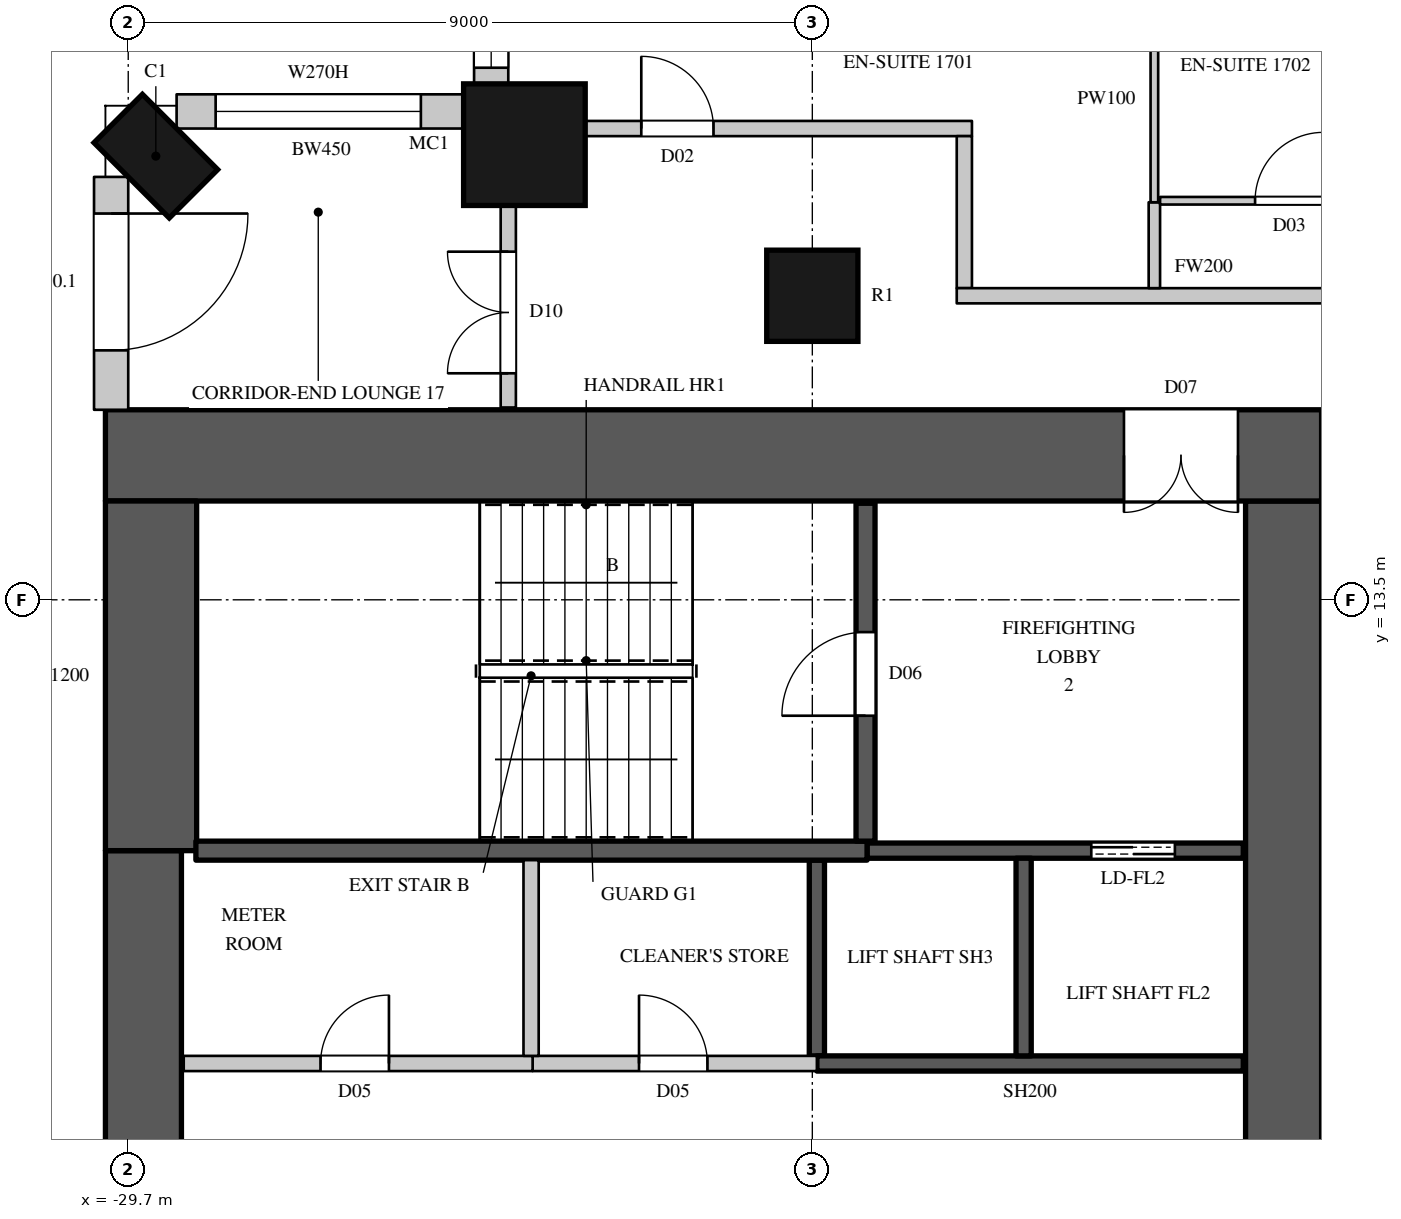
"""IFC4 building model, lengths in metres.
Left out: names, types, materials, properties, quantities, classifications, styles, units other than length and angle.
Written with IfcOpenShell. Run it as: python <this file> out.ifc"""

import sys

from ifc_helpers import new_model, si_unit, direction, frame, frame_2d, origin, origin_2d, place, context, subcontext, project, spatial, rectangle, circle, extrude, element, fill, save


model = new_model("IFC4")
c1 = context("Model", 3, precision=1e-05, world=origin(), true_north=direction((0.0, 1.0)))
c2 = subcontext(c1, "Body", "Model", "MODEL_VIEW")
j1 = project(units=[si_unit("LENGTHUNIT", "METRE"), si_unit("PLANEANGLEUNIT", "RADIAN")], contexts=[c1])
p1 = place(None, origin())
s1 = spatial("IfcSite", under=j1, at=p1, CompositionType="ELEMENT")
p2 = place(p1, origin())
s2 = spatial("IfcBuilding", under=s1, at=p2, CompositionType="ELEMENT")
p3 = place(p2, frame((0.0, 0.0, 91.5)))
s3 = spatial("IfcBuildingStorey", under=s2, at=p3, CompositionType="ELEMENT", Elevation=91.5)
p4 = place(p3, frame((-29.337, 19.337, 0.0), z_axis=(0.0, 0.0, 1.0), x_axis=(-0.707106781187, -0.707106781187, 0.0)))
e1 = element("IfcColumn", 1, at=p4, inside=s3, PredefinedType="COLUMN", context=c2, shape_type="SweptSolid", body=[
    extrude(rectangle(XDim=0.9, YDim=1.4, at=origin_2d()), origin(), (0.0, 0.0, 1.0), 3.6),
])
p5 = place(p3, frame((-24.488, 19.488, 0.0), z_axis=(0.0, 0.0, 1.0), x_axis=(1.0, 0.0, 0.0)))
e2 = element("IfcColumn", 2, at=p5, inside=s3, PredefinedType="COLUMN", context=c2, shape_type="SweptSolid", body=[
    extrude(circle(Radius=0.8, at=origin_2d()), origin(), (0.0, 0.0, 1.0), 3.6),
])
p6 = place(p3, frame((-20.7, 17.5, 0.0), z_axis=(0.0, 0.0, 1.0), x_axis=(1.0, 0.0, 0.0)))
e3 = element("IfcColumn", 3, at=p6, inside=s3, PredefinedType="COLUMN", context=c2, shape_type="SweptSolid", body=[
    extrude(circle(Radius=0.6, at=origin_2d()), origin(), (0.0, 0.0, 1.0), 3.6),
])
p7 = place(p3, frame((-29.925, 19.064, 0.0), z_axis=(0.0, 0.0, 1.0), x_axis=(0.0, -1.0, 0.0)))
e4 = element("IfcWall", 4, at=p7, inside=s3, PredefinedType="SOLIDWALL", context=c2, shape_type="SweptSolid", body=[
    extrude(rectangle(XDim=3.064, YDim=0.45, at=frame_2d((1.532, 0.0))), origin(), (0.0, 0.0, 1.0), 3.3),
])
p8 = place(p7, frame((0.482, 0.0, 0.0)))
e5 = element("IfcOpeningElement", 5, at=p8, cuts=e4, PredefinedType="OPENING", context=c2, shape_type="SweptSolid", body=[
    extrude(rectangle(XDim=1.8, YDim=2.4, at=frame_2d((0.9, 1.2))), frame((0.0, 0.235, 0.0), z_axis=(0.0, -1.0, 0.0), x_axis=(1.0, 0.0, 0.0)), (0.0, 0.0, 1.0), 0.47),
])
p9 = place(p3, frame((-24.925, 22.05, 0.0), z_axis=(0.0, 0.0, 1.0), x_axis=(0.0, -1.0, 0.0)))
e6 = element("IfcWall", 6, at=p9, inside=s3, PredefinedType="SOLIDWALL", context=c2, shape_type="SweptSolid", body=[
    extrude(rectangle(XDim=1.792, YDim=0.45, at=frame_2d((0.896, 0.0))), origin(), (0.0, 0.0, 1.0), 3.3),
])
p10 = place(p9, frame((0.35, 0.0, 1.05)))
e7 = element("IfcOpeningElement", 7, at=p10, cuts=e6, PredefinedType="OPENING", context=c2, shape_type="SweptSolid", body=[
    extrude(rectangle(XDim=1.2, YDim=2.0, at=frame_2d((0.6, 1.0))), frame((0.0, 0.235, 0.0), z_axis=(0.0, -1.0, 0.0), x_axis=(1.0, 0.0, 0.0)), (0.0, 0.0, 1.0), 0.47),
])
p11 = place(p3, frame((-25.259, 19.925, 0.0), z_axis=(0.0, 0.0, 1.0), x_axis=(-1.0, 0.0, 0.0)))
e8 = element("IfcWall", 8, at=p11, inside=s3, PredefinedType="SOLIDWALL", context=c2, shape_type="SweptSolid", body=[
    extrude(rectangle(XDim=3.805, YDim=0.45, at=frame_2d((1.903, 0.0))), origin(), (0.0, 0.0, 1.0), 3.3),
])
p12 = place(p11, frame((0.592, 0.0, 1.05)))
e9 = element("IfcOpeningElement", 9, at=p12, cuts=e8, PredefinedType="OPENING", context=c2, shape_type="SweptSolid", body=[
    extrude(rectangle(XDim=2.7, YDim=2.0, at=frame_2d((1.35, 1.0))), frame((0.0, 0.235, 0.0), z_axis=(0.0, -1.0, 0.0), x_axis=(1.0, 0.0, 0.0)), (0.0, 0.0, 1.0), 0.47),
])
p13 = place(p3, frame((-30.0, 15.4, 0.0), z_axis=(0.0, 0.0, 1.0), x_axis=(1.0, 0.0, 0.0)))
e10 = element("IfcWall", 10, at=p13, inside=s3, PredefinedType="SHEAR", context=c2, shape_type="SweptSolid", body=[
    extrude(rectangle(XDim=16.0, YDim=1.2, at=frame_2d((8.0, 0.0))), origin(), (0.0, 0.0, 1.0), 3.6),
])
p14 = place(p13, frame((13.4, 0.0, 0.0)))
e11 = element("IfcOpeningElement", 11, at=p14, cuts=e10, PredefinedType="OPENING", context=c2, shape_type="SweptSolid", body=[
    extrude(rectangle(XDim=1.5, YDim=2.4, at=frame_2d((0.75, 1.2))), frame((0.0, 0.61, 0.0), z_axis=(0.0, -1.0, 0.0), x_axis=(1.0, 0.0, 0.0)), (0.0, 0.0, 1.0), 1.22),
])
p15 = place(p3, frame((-14.5, -14.8, 0.0), z_axis=(0.0, 0.0, 1.0), x_axis=(0.0, 1.0, 0.0)))
e12 = element("IfcWall", 12, at=p15, inside=s3, PredefinedType="SHEAR", context=c2, shape_type="SweptSolid", body=[
    extrude(rectangle(XDim=29.6, YDim=1.0, at=frame_2d((14.8, 0.0))), origin(), (0.0, 0.0, 1.0), 3.6),
])
p16 = place(p15, frame((8.45, 0.0, 0.0)))
e13 = element("IfcOpeningElement", 13, at=p16, cuts=e12, PredefinedType="OPENING", context=c2, shape_type="SweptSolid", body=[
    extrude(rectangle(XDim=1.5, YDim=2.4, at=frame_2d((0.75, 1.2))), frame((0.0, 0.51, 0.0), z_axis=(0.0, -1.0, 0.0), x_axis=(1.0, 0.0, 0.0)), (0.0, 0.0, 1.0), 1.02),
])
p17 = place(p15, frame((19.65, 0.0, 0.0)))
e14 = element("IfcOpeningElement", 14, at=p17, cuts=e12, PredefinedType="OPENING", context=c2, shape_type="SweptSolid", body=[
    extrude(rectangle(XDim=1.5, YDim=2.4, at=frame_2d((0.75, 1.2))), frame((0.0, 0.51, 0.0), z_axis=(0.0, -1.0, 0.0), x_axis=(1.0, 0.0, 0.0)), (0.0, 0.0, 1.0), 1.02),
])
p18 = place(p15, frame((14.5, 0.0, 0.0)))
e15 = element("IfcOpeningElement", 15, at=p18, cuts=e12, PredefinedType="OPENING", context=c2, shape_type="SweptSolid", body=[
    extrude(rectangle(XDim=0.6, YDim=2.0, at=frame_2d((0.3, 1.0))), frame((0.0, 0.51, 0.0), z_axis=(0.0, -1.0, 0.0), x_axis=(1.0, 0.0, 0.0)), (0.0, 0.0, 1.0), 1.02),
])
p19 = place(p3, frame((-29.5, -10.2, 0.0), z_axis=(0.0, 0.0, 1.0), x_axis=(0.0, 1.0, 0.0)))
e16 = element("IfcWall", 16, at=p19, inside=s3, PredefinedType="SHEAR", context=c2, shape_type="SweptSolid", body=[
    extrude(rectangle(XDim=20.4, YDim=1.0, at=frame_2d((10.2, 0.0))), origin(), (0.0, 0.0, 1.0), 3.6),
])
p20 = place(p3, frame((-29.4, 10.2, 0.0), z_axis=(0.0, 0.0, 1.0), x_axis=(0.0, 1.0, 0.0)))
e17 = element("IfcWall", 17, at=p20, inside=s3, PredefinedType="SHEAR", context=c2, shape_type="SweptSolid", body=[
    extrude(rectangle(XDim=4.6, YDim=1.2, at=frame_2d((2.3, 0.0))), origin(), (0.0, 0.0, 1.0), 3.6),
])
p21 = place(p3, frame((-24.7, 16.03, 0.0), z_axis=(0.0, 0.0, 1.0), x_axis=(0.0, 1.0, 0.0)))
e18 = element("IfcWall", 18, at=p21, inside=s3, PredefinedType="PARTITIONING", context=c2, shape_type="SweptSolid", body=[
    extrude(rectangle(XDim=2.67, YDim=0.2, at=frame_2d((1.335, 0.0))), origin(), (0.0, 0.0, 1.0), 3.3),
])
p22 = place(p21, frame((0.45, 0.0, 0.0)))
e19 = element("IfcOpeningElement", 19, at=p22, cuts=e18, PredefinedType="OPENING", context=c2, shape_type="SweptSolid", body=[
    extrude(rectangle(XDim=1.6, YDim=2.4, at=frame_2d((0.8, 1.2))), frame((0.0, 0.11, 0.0), z_axis=(0.0, -1.0, 0.0), x_axis=(1.0, 0.0, 0.0)), (0.0, 0.0, 1.0), 0.22),
])
p23 = place(p3, frame((-23.7, 19.7, 0.0), z_axis=(0.0, 0.0, 1.0), x_axis=(1.0, 0.0, 0.0)))
e20 = element("IfcWall", 20, at=p23, inside=s3, PredefinedType="PARTITIONING", context=c2, shape_type="SweptSolid", body=[
    extrude(rectangle(XDim=5.1, YDim=0.2, at=frame_2d((2.55, 0.0))), origin(), (0.0, 0.0, 1.0), 3.3),
])
p24 = place(p23, frame((0.75, 0.0, 0.0)))
e21 = element("IfcOpeningElement", 21, at=p24, cuts=e20, PredefinedType="OPENING", context=c2, shape_type="SweptSolid", body=[
    extrude(rectangle(XDim=0.95, YDim=2.2, at=frame_2d((0.475, 1.1))), frame((0.0, 0.11, 0.0), z_axis=(0.0, -1.0, 0.0), x_axis=(1.0, 0.0, 0.0)), (0.0, 0.0, 1.0), 0.22),
])
p25 = place(p3, frame((-24.38, 7.4, 0.0), z_axis=(0.0, 0.0, 1.0), x_axis=(1.0, 0.0, 0.0)))
e22 = element("IfcWall", 22, at=p25, inside=s3, PredefinedType="PARTITIONING", context=c2, shape_type="SweptSolid", body=[
    extrude(rectangle(XDim=3.74, YDim=0.2, at=frame_2d((1.87, 0.0))), origin(), (0.0, 0.0, 1.0), 3.3),
])
p26 = place(p25, frame((1.4, 0.0, 0.0)))
e23 = element("IfcOpeningElement", 23, at=p26, cuts=e22, PredefinedType="OPENING", context=c2, shape_type="SweptSolid", body=[
    extrude(rectangle(XDim=0.9, YDim=2.2, at=frame_2d((0.45, 1.1))), frame((0.0, 0.11, 0.0), z_axis=(0.0, -1.0, 0.0), x_axis=(1.0, 0.0, 0.0)), (0.0, 0.0, 1.0), 0.22),
])
p27 = place(p3, frame((-18.7, 17.6, 0.0), z_axis=(0.0, 0.0, 1.0), x_axis=(0.0, 1.0, 0.0)))
e24 = element("IfcWall", 24, at=p27, inside=s3, PredefinedType="PARTITIONING", context=c2, shape_type="SweptSolid", body=[
    extrude(rectangle(XDim=2.0, YDim=0.2, at=frame_2d((1.0, 0.0))), origin(), (0.0, 0.0, 1.0), 3.3),
])
p28 = place(p3, frame((-18.8, 17.5, 0.0), z_axis=(0.0, 0.0, 1.0), x_axis=(1.0, 0.0, 0.0)))
e25 = element("IfcWall", 25, at=p28, inside=s3, PredefinedType="PARTITIONING", context=c2, shape_type="SweptSolid", body=[
    extrude(rectangle(XDim=6.5, YDim=0.2, at=frame_2d((3.25, 0.0))), origin(), (0.0, 0.0, 1.0), 2.75),
])
p29 = place(p28, frame((5.25, 0.0, 0.0)))
e26 = element("IfcOpeningElement", 26, at=p29, cuts=e25, PredefinedType="OPENING", context=c2, shape_type="SweptSolid", body=[
    extrude(rectangle(XDim=0.95, YDim=2.2, at=frame_2d((0.475, 1.1))), frame((0.0, 0.11, 0.0), z_axis=(0.0, -1.0, 0.0), x_axis=(1.0, 0.0, 0.0)), (0.0, 0.0, 1.0), 0.22),
])
p30 = place(p3, frame((-16.2, 17.6, 0.0), z_axis=(0.0, 0.0, 1.0), x_axis=(0.0, 1.0, 0.0)))
e27 = element("IfcWall", 27, at=p30, inside=s3, PredefinedType="PARTITIONING", context=c2, shape_type="SweptSolid", body=[
    extrude(rectangle(XDim=1.13, YDim=0.15, at=frame_2d((0.565, 0.0))), origin(), (0.0, 0.0, 1.0), 2.65),
])
p31 = place(p3, frame((-28.97, 7.4, 0.0), z_axis=(0.0, 0.0, 1.0), x_axis=(1.0, 0.0, 0.0)))
e28 = element("IfcWall", 28, at=p31, inside=s3, PredefinedType="PARTITIONING", context=c2, shape_type="SweptSolid", body=[
    extrude(rectangle(XDim=4.59, YDim=0.2, at=frame_2d((2.295, 0.0))), origin(), (0.0, 0.0, 1.0), 3.3),
])
p32 = place(p31, frame((1.8, 0.0, 0.0)))
e29 = element("IfcOpeningElement", 29, at=p32, cuts=e28, PredefinedType="OPENING", context=c2, shape_type="SweptSolid", body=[
    extrude(rectangle(XDim=0.9, YDim=2.2, at=frame_2d((0.45, 1.1))), frame((0.0, 0.11, 0.0), z_axis=(0.0, -1.0, 0.0), x_axis=(1.0, 0.0, 0.0)), (0.0, 0.0, 1.0), 0.22),
])
p33 = place(p3, frame((-24.4, 7.5, 0.0), z_axis=(0.0, 0.0, 1.0), x_axis=(0.0, 1.0, 0.0)))
e30 = element("IfcWall", 30, at=p33, inside=s3, PredefinedType="PARTITIONING", context=c2, shape_type="SweptSolid", body=[
    extrude(rectangle(XDim=2.575, YDim=0.2, at=frame_2d((1.288, 0.0))), origin(), (0.0, 0.0, 1.0), 3.3),
])
p34 = place(p3, frame((-20.64, 7.5, 0.0), z_axis=(0.0, 0.0, 1.0), x_axis=(0.0, 1.0, 0.0)))
e31 = element("IfcWall", 31, at=p34, inside=s3, PredefinedType="SHEAR", context=c2, shape_type="SweptSolid", body=[
    extrude(rectangle(XDim=2.575, YDim=0.2, at=frame_2d((1.288, 0.0))), origin(), (0.0, 0.0, 1.0), 3.3),
])
p35 = place(p3, frame((-20.64, 7.4, 0.0), z_axis=(0.0, 0.0, 1.0), x_axis=(1.0, 0.0, 0.0)))
e32 = element("IfcWall", 32, at=p35, inside=s3, PredefinedType="SHEAR", context=c2, shape_type="SweptSolid", body=[
    extrude(rectangle(XDim=5.61, YDim=0.2, at=frame_2d((2.805, 0.0))), origin(), (0.0, 0.0, 1.0), 3.3),
])
p36 = place(p3, frame((-19.98, 10.2, 0.0), z_axis=(0.0, 0.0, 1.0), x_axis=(1.0, 0.0, 0.0)))
e33 = element("IfcWall", 33, at=p36, inside=s3, PredefinedType="SHEAR", context=c2, shape_type="SweptSolid", body=[
    extrude(rectangle(XDim=4.95, YDim=0.2, at=frame_2d((2.475, 0.0))), origin(), (0.0, 0.0, 1.0), 3.3),
])
p37 = place(p36, frame((2.95, 0.0, 0.0)))
e34 = element("IfcOpeningElement", 34, at=p37, cuts=e33, PredefinedType="OPENING", context=c2, shape_type="SweptSolid", body=[
    extrude(rectangle(XDim=1.1, YDim=2.2, at=frame_2d((0.55, 1.1))), frame((0.0, 0.11, 0.0), z_axis=(0.0, -1.0, 0.0), x_axis=(1.0, 0.0, 0.0)), (0.0, 0.0, 1.0), 0.22),
])
p38 = place(p3, frame((-17.92, 7.5, 0.0), z_axis=(0.0, 0.0, 1.0), x_axis=(0.0, 1.0, 0.0)))
e35 = element("IfcWall", 35, at=p38, inside=s3, PredefinedType="SHEAR", context=c2, shape_type="SweptSolid", body=[
    extrude(rectangle(XDim=2.6, YDim=0.2, at=frame_2d((1.3, 0.0))), origin(), (0.0, 0.0, 1.0), 3.6),
])
p39 = place(p3, frame((-28.81, 10.2, 0.0), z_axis=(0.0, 0.0, 1.0), x_axis=(1.0, 0.0, 0.0)))
e36 = element("IfcWall", 36, at=p39, inside=s3, PredefinedType="SHEAR", context=c2, shape_type="SweptSolid", body=[
    extrude(rectangle(XDim=8.83, YDim=0.25, at=frame_2d((4.415, 0.0))), origin(), (0.0, 0.0, 1.0), 3.3),
])
p40 = place(p3, frame((-20.0, 10.325, 0.0), z_axis=(0.0, 0.0, 1.0), x_axis=(0.0, 1.0, 0.0)))
e37 = element("IfcWall", 37, at=p40, inside=s3, PredefinedType="SHEAR", context=c2, shape_type="SweptSolid", body=[
    extrude(rectangle(XDim=4.445, YDim=0.25, at=frame_2d((2.223, 0.0))), origin(), (0.0, 0.0, 1.0), 3.3),
])
p41 = place(p40, frame((1.65, 0.0, 0.0)))
e38 = element("IfcOpeningElement", 38, at=p41, cuts=e37, PredefinedType="OPENING", context=c2, shape_type="SweptSolid", body=[
    extrude(rectangle(XDim=1.1, YDim=2.2, at=frame_2d((0.55, 1.1))), frame((0.0, 0.135, 0.0), z_axis=(0.0, -1.0, 0.0), x_axis=(1.0, 0.0, 0.0)), (0.0, 0.0, 1.0), 0.27),
])
p42 = place(p3, frame((-16.2, 18.73, 0.0), z_axis=(0.0, 0.0, 1.0), x_axis=(0.0, 1.0, 0.0)))
e39 = element("IfcWall", 39, at=p42, inside=s3, PredefinedType="PARTITIONING", context=c2, shape_type="SweptSolid", body=[
    extrude(rectangle(XDim=2.7, YDim=0.1, at=frame_2d((1.35, 0.0))), origin(), (0.0, 0.0, 1.0), 2.65),
])
p43 = place(p3, frame((-16.125, 18.75, 0.0), z_axis=(0.0, 0.0, 1.0), x_axis=(1.0, 0.0, 0.0)))
e40 = element("IfcWall", 40, at=p43, inside=s3, PredefinedType="PARTITIONING", context=c2, shape_type="SweptSolid", body=[
    extrude(rectangle(XDim=2.371, YDim=0.1, at=frame_2d((1.186, 0.0))), origin(), (0.0, 0.0, 1.0), 3.3),
])
p44 = place(p43, frame((1.25, 0.0, 0.0)))
e41 = element("IfcOpeningElement", 41, at=p44, cuts=e40, PredefinedType="OPENING", context=c2, shape_type="SweptSolid", body=[
    extrude(rectangle(XDim=0.9, YDim=2.2, at=frame_2d((0.45, 1.1))), frame((0.0, 0.06, 0.0), z_axis=(0.0, -1.0, 0.0), x_axis=(1.0, 0.0, 0.0)), (0.0, 0.0, 1.0), 0.12),
])
p45 = place(p8, origin())
e42 = element("IfcDoor", 42, at=p45, inside=s3, OperationType="SLIDING_TO_LEFT", PredefinedType="DOOR", context=c2, shape_type="SweptSolid", body=[
    extrude(rectangle(XDim=1.8, YDim=2.4, at=frame_2d((0.9, 1.2))), frame((0.0, 0.13, 0.0), z_axis=(0.0, -1.0, 0.0), x_axis=(1.0, 0.0, 0.0)), (0.0, 0.0, 1.0), 0.05),
])
fill(e5, e42)
p46 = place(p10, origin())
e43 = element("IfcWindow", 43, at=p46, inside=s3, PartitioningType="SINGLE_PANEL", PredefinedType="WINDOW", context=c2, shape_type="SweptSolid", body=[
    extrude(rectangle(XDim=1.2, YDim=2.0, at=frame_2d((0.6, 1.0))), frame((0.0, 0.135, 0.0), z_axis=(0.0, -1.0, 0.0), x_axis=(1.0, 0.0, 0.0)), (0.0, 0.0, 1.0), 0.06),
])
fill(e7, e43)
p47 = place(p12, origin())
e44 = element("IfcWindow", 44, at=p47, inside=s3, PartitioningType="SINGLE_PANEL", PredefinedType="WINDOW", context=c2, shape_type="SweptSolid", body=[
    extrude(rectangle(XDim=2.7, YDim=2.0, at=frame_2d((1.35, 1.0))), frame((0.0, 0.135, 0.0), z_axis=(0.0, -1.0, 0.0), x_axis=(1.0, 0.0, 0.0)), (0.0, 0.0, 1.0), 0.06),
])
fill(e9, e44)
p48 = place(p41, origin())
e45 = element("IfcDoor", 45, at=p48, inside=s3, OperationType="SINGLE_SWING_LEFT", PredefinedType="DOOR", context=c2, shape_type="SweptSolid", body=[
    extrude(rectangle(XDim=1.1, YDim=2.2, at=frame_2d((0.55, 1.1))), frame((0.0, 0.025, 0.0), z_axis=(0.0, -1.0, 0.0), x_axis=(1.0, 0.0, 0.0)), (0.0, 0.0, 1.0), 0.05),
])
fill(e38, e45)
p49 = place(p32, origin())
e46 = element("IfcDoor", 46, at=p49, inside=s3, OperationType="SINGLE_SWING_RIGHT", PredefinedType="DOOR", context=c2, shape_type="SweptSolid", body=[
    extrude(rectangle(XDim=0.9, YDim=2.2, at=frame_2d((0.45, 1.1))), frame((0.0, 0.025, 0.0), z_axis=(0.0, -1.0, 0.0), x_axis=(1.0, 0.0, 0.0)), (0.0, 0.0, 1.0), 0.05),
])
fill(e29, e46)
p50 = place(p26, origin())
e47 = element("IfcDoor", 47, at=p50, inside=s3, OperationType="SINGLE_SWING_LEFT", PredefinedType="DOOR", context=c2, shape_type="SweptSolid", body=[
    extrude(rectangle(XDim=0.9, YDim=2.2, at=frame_2d((0.45, 1.1))), frame((0.0, 0.025, 0.0), z_axis=(0.0, -1.0, 0.0), x_axis=(1.0, 0.0, 0.0)), (0.0, 0.0, 1.0), 0.05),
])
fill(e23, e47)
p51 = place(p37, origin())
e48 = element("IfcDoor", 48, at=p51, inside=s3, OperationType="DOUBLE_DOOR_SLIDING", PredefinedType="DOOR", context=c2, shape_type="SweptSolid", body=[
    extrude(rectangle(XDim=1.1, YDim=2.2, at=frame_2d((0.55, 1.1))), frame((0.0, 0.025, 0.0), z_axis=(0.0, -1.0, 0.0), x_axis=(1.0, 0.0, 0.0)), (0.0, 0.0, 1.0), 0.05),
])
fill(e34, e48)
p52 = place(p22, origin())
e49 = element("IfcDoor", 49, at=p52, inside=s3, OperationType="DOUBLE_DOOR_SINGLE_SWING", PredefinedType="DOOR", context=c2, shape_type="SweptSolid", body=[
    extrude(rectangle(XDim=1.6, YDim=2.4, at=frame_2d((0.8, 1.2))), frame((0.0, 0.025, 0.0), z_axis=(0.0, -1.0, 0.0), x_axis=(1.0, 0.0, 0.0)), (0.0, 0.0, 1.0), 0.05),
])
fill(e19, e49)
p53 = place(p24, origin())
e50 = element("IfcDoor", 50, at=p53, inside=s3, OperationType="SINGLE_SWING_LEFT", PredefinedType="DOOR", context=c2, shape_type="SweptSolid", body=[
    extrude(rectangle(XDim=0.95, YDim=2.2, at=frame_2d((0.475, 1.1))), frame((0.0, 0.025, 0.0), z_axis=(0.0, -1.0, 0.0), x_axis=(1.0, 0.0, 0.0)), (0.0, 0.0, 1.0), 0.05),
])
fill(e21, e50)
p54 = place(p44, origin())
e51 = element("IfcDoor", 51, at=p54, inside=s3, OperationType="SINGLE_SWING_RIGHT", PredefinedType="DOOR", context=c2, shape_type="SweptSolid", body=[
    extrude(rectangle(XDim=0.9, YDim=2.2, at=frame_2d((0.45, 1.1))), frame((0.0, 0.025, 0.0), z_axis=(0.0, -1.0, 0.0), x_axis=(1.0, 0.0, 0.0)), (0.0, 0.0, 1.0), 0.05),
])
fill(e41, e51)
p55 = place(p14, origin())
e52 = element("IfcDoor", 52, at=p55, inside=s3, OperationType="DOUBLE_DOOR_SINGLE_SWING", PredefinedType="DOOR", context=c2, shape_type="SweptSolid", body=[
    extrude(rectangle(XDim=1.5, YDim=2.4, at=frame_2d((0.75, 1.2))), frame((0.0, 0.025, 0.0), z_axis=(0.0, -1.0, 0.0), x_axis=(1.0, 0.0, 0.0)), (0.0, 0.0, 1.0), 0.05),
])
fill(e11, e52)
save(model, sys.argv[1])
